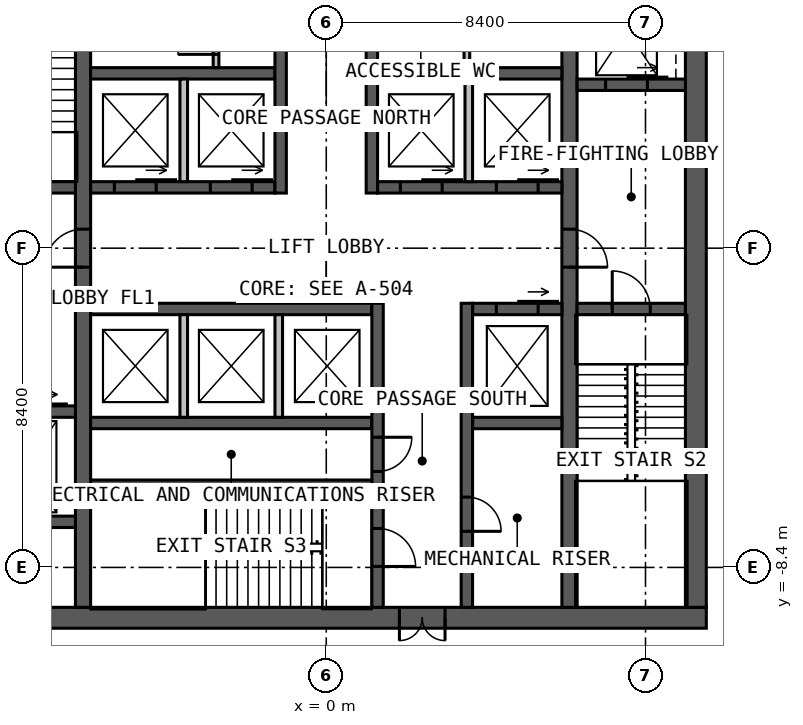
"""IFC4 building model, lengths in metres.
Left out: names, types, materials, properties, quantities, classifications, styles, units other than length and angle.
Written with IfcOpenShell. Run it as: python <this file> out.ifc"""

import sys

from ifc_helpers import new_model, si_unit, direction, frame, frame_2d, origin, place, context, subcontext, project, spatial, rectangle, extrude, element, fill, save


model = new_model("IFC4")
c1 = context("Model", 3, precision=1e-05, world=origin(), true_north=direction((0.0, 1.0)))
c2 = subcontext(c1, "Body", "Model", "MODEL_VIEW")
j1 = project(units=[si_unit("LENGTHUNIT", "METRE"), si_unit("PLANEANGLEUNIT", "RADIAN")], contexts=[c1])
p1 = place(None, origin())
s1 = spatial("IfcSite", under=j1, at=p1, CompositionType="ELEMENT")
p2 = place(p1, origin())
s2 = spatial("IfcBuilding", under=s1, at=p2, CompositionType="ELEMENT")
p3 = place(p2, frame((0.0, 0.0, 110.0)))
s3 = spatial("IfcBuildingStorey", under=s2, at=p3, CompositionType="ELEMENT", Elevation=110.0)
p4 = place(p3, frame((10.0, -9.725, 0.0), z_axis=(0.0, 0.0, 1.0), x_axis=(-1.0, 0.0, 0.0)))
e1 = element("IfcWall", 1, at=p4, inside=s3, PredefinedType="SOLIDWALL", context=c2, shape_type="SweptSolid", body=[
    extrude(rectangle(XDim=20.0, YDim=0.55, at=frame_2d((10.0, 0.0))), origin(), (0.0, 0.0, 1.0), 4.0),
])
p5 = place(p4, frame((6.875, 0.0, 0.0)))
e2 = element("IfcOpeningElement", 2, at=p5, cuts=e1, PredefinedType="OPENING", context=c2, shape_type="SweptSolid", body=[
    extrude(rectangle(XDim=1.2, YDim=2.2, at=frame_2d((0.6, 1.1))), frame((0.0, 0.285, 0.0), z_axis=(0.0, -1.0, 0.0), x_axis=(1.0, 0.0, 0.0)), (0.0, 0.0, 1.0), 0.57),
])
p6 = place(p3, frame((9.725, -9.45, 0.0), z_axis=(0.0, 0.0, 1.0), x_axis=(0.0, 1.0, 0.0)))
e3 = element("IfcWall", 3, at=p6, inside=s3, PredefinedType="SOLIDWALL", context=c2, shape_type="SweptSolid", body=[
    extrude(rectangle(XDim=18.9, YDim=0.55, at=frame_2d((9.45, 0.0))), origin(), (0.0, 0.0, 1.0), 4.0),
])
p7 = place(p3, frame((-6.4, -9.45, 0.0), z_axis=(0.0, 0.0, 1.0), x_axis=(0.0, 1.0, 0.0)))
e4 = element("IfcWall", 4, at=p7, inside=s3, PredefinedType="SOLIDWALL", context=c2, shape_type="SweptSolid", body=[
    extrude(rectangle(XDim=18.9, YDim=0.4, at=frame_2d((9.45, 0.0))), origin(), (0.0, 0.0, 1.0), 4.0),
])
p8 = place(p7, frame((8.95, 0.0, 0.0)))
e5 = element("IfcOpeningElement", 5, at=p8, cuts=e4, PredefinedType="OPENING", context=c2, shape_type="SweptSolid", body=[
    extrude(rectangle(XDim=1.0, YDim=2.2, at=frame_2d((0.5, 1.1))), frame((0.0, 0.21, 0.0), z_axis=(0.0, -1.0, 0.0), x_axis=(1.0, 0.0, 0.0)), (0.0, 0.0, 1.0), 0.42),
])
p9 = place(p3, frame((6.4, 9.45, 0.0), z_axis=(0.0, 0.0, 1.0), x_axis=(0.0, -1.0, 0.0)))
e6 = element("IfcWall", 6, at=p9, inside=s3, PredefinedType="SOLIDWALL", context=c2, shape_type="SweptSolid", body=[
    extrude(rectangle(XDim=18.9, YDim=0.4, at=frame_2d((9.45, 0.0))), origin(), (0.0, 0.0, 1.0), 4.0),
])
p10 = place(p9, frame((8.95, 0.0, 0.0)))
e7 = element("IfcOpeningElement", 7, at=p10, cuts=e6, PredefinedType="OPENING", context=c2, shape_type="SweptSolid", body=[
    extrude(rectangle(XDim=1.0, YDim=2.2, at=frame_2d((0.5, 1.1))), frame((0.0, 0.21, 0.0), z_axis=(0.0, -1.0, 0.0), x_axis=(1.0, 0.0, 0.0)), (0.0, 0.0, 1.0), 0.42),
])
p11 = place(p3, frame((-6.2, 1.6, 0.0), z_axis=(0.0, 0.0, 1.0), x_axis=(1.0, 0.0, 0.0)))
e8 = element("IfcWall", 8, at=p11, inside=s3, PredefinedType="SOLIDWALL", context=c2, shape_type="SweptSolid", body=[
    extrude(rectangle(XDim=4.85, YDim=0.3, at=frame_2d((2.425, 0.0))), origin(), (0.0, 0.0, 1.0), 4.0),
])
p12 = place(p11, frame((0.625, 0.0, 0.0)))
e9 = element("IfcOpeningElement", 9, at=p12, cuts=e8, PredefinedType="OPENING", context=c2, shape_type="SweptSolid", body=[
    extrude(rectangle(XDim=1.1, YDim=2.2, at=frame_2d((0.55, 1.1))), frame((0.0, 0.16, 0.0), z_axis=(0.0, -1.0, 0.0), x_axis=(1.0, 0.0, 0.0)), (0.0, 0.0, 1.0), 0.32),
])
p13 = place(p11, frame((3.15, 0.0, 0.0)))
e10 = element("IfcOpeningElement", 10, at=p13, cuts=e8, PredefinedType="OPENING", context=c2, shape_type="SweptSolid", body=[
    extrude(rectangle(XDim=1.1, YDim=2.2, at=frame_2d((0.55, 1.1))), frame((0.0, 0.16, 0.0), z_axis=(0.0, -1.0, 0.0), x_axis=(1.0, 0.0, 0.0)), (0.0, 0.0, 1.0), 0.32),
])
p14 = place(p3, frame((1.35, 1.6, 0.0), z_axis=(0.0, 0.0, 1.0), x_axis=(1.0, 0.0, 0.0)))
e11 = element("IfcWall", 11, at=p14, inside=s3, PredefinedType="SOLIDWALL", context=c2, shape_type="SweptSolid", body=[
    extrude(rectangle(XDim=4.85, YDim=0.3, at=frame_2d((2.425, 0.0))), origin(), (0.0, 0.0, 1.0), 4.0),
])
p15 = place(p14, frame((0.6, 0.0, 0.0)))
e12 = element("IfcOpeningElement", 12, at=p15, cuts=e11, PredefinedType="OPENING", context=c2, shape_type="SweptSolid", body=[
    extrude(rectangle(XDim=1.1, YDim=2.2, at=frame_2d((0.55, 1.1))), frame((0.0, 0.16, 0.0), z_axis=(0.0, -1.0, 0.0), x_axis=(1.0, 0.0, 0.0)), (0.0, 0.0, 1.0), 0.32),
])
p16 = place(p14, frame((3.125, 0.0, 0.0)))
e13 = element("IfcOpeningElement", 13, at=p16, cuts=e11, PredefinedType="OPENING", context=c2, shape_type="SweptSolid", body=[
    extrude(rectangle(XDim=1.1, YDim=2.2, at=frame_2d((0.55, 1.1))), frame((0.0, 0.16, 0.0), z_axis=(0.0, -1.0, 0.0), x_axis=(1.0, 0.0, 0.0)), (0.0, 0.0, 1.0), 0.32),
])
for number, where, z_axis, x_axis in (
    (14, (-6.2, 4.6, 0.0), (0.0, 0.0, 1.0), (1.0, 0.0, 0.0)),
    (15, (1.35, 4.6, 0.0), (0.0, 0.0, 1.0), (1.0, 0.0, 0.0)),
):
    element("IfcWall", number, at=place(p3, frame(where, z_axis=z_axis, x_axis=x_axis)), inside=s3, PredefinedType="SOLIDWALL", context=c2, shape_type="SweptSolid", body=[
        extrude(rectangle(XDim=4.85, YDim=0.3, at=frame_2d((2.425, 0.0))), origin(), (0.0, 0.0, 1.0), 4.0),
    ])
p17 = place(p3, frame((-1.2, 1.45, 0.0), z_axis=(0.0, 0.0, 1.0), x_axis=(0.0, 1.0, 0.0)))
e16 = element("IfcWall", 16, at=p17, inside=s3, PredefinedType="SOLIDWALL", context=c2, shape_type="SweptSolid", body=[
    extrude(rectangle(XDim=8.0, YDim=0.3, at=frame_2d((4.0, 0.0))), origin(), (0.0, 0.0, 1.0), 4.0),
])
p18 = place(p17, frame((5.05, 0.0, 0.0)))
e17 = element("IfcOpeningElement", 17, at=p18, cuts=e16, PredefinedType="OPENING", context=c2, shape_type="SweptSolid", body=[
    extrude(rectangle(XDim=1.0, YDim=2.2, at=frame_2d((0.5, 1.1))), frame((0.0, 0.16, 0.0), z_axis=(0.0, -1.0, 0.0), x_axis=(1.0, 0.0, 0.0)), (0.0, 0.0, 1.0), 0.32),
])
p19 = place(p3, frame((1.2, 1.45, 0.0), z_axis=(0.0, 0.0, 1.0), x_axis=(0.0, 1.0, 0.0)))
e18 = element("IfcWall", 18, at=p19, inside=s3, PredefinedType="SOLIDWALL", context=c2, shape_type="SweptSolid", body=[
    extrude(rectangle(XDim=8.0, YDim=0.3, at=frame_2d((4.0, 0.0))), origin(), (0.0, 0.0, 1.0), 4.0),
])
p20 = place(p19, frame((3.8, 0.0, 0.0)))
e19 = element("IfcOpeningElement", 19, at=p20, cuts=e18, PredefinedType="OPENING", context=c2, shape_type="SweptSolid", body=[
    extrude(rectangle(XDim=1.0, YDim=2.2, at=frame_2d((0.5, 1.1))), frame((0.0, 0.16, 0.0), z_axis=(0.0, -1.0, 0.0), x_axis=(1.0, 0.0, 0.0)), (0.0, 0.0, 1.0), 0.32),
])
p21 = place(p19, frame((6.15, 0.0, 0.0)))
e20 = element("IfcOpeningElement", 20, at=p21, cuts=e18, PredefinedType="OPENING", context=c2, shape_type="SweptSolid", body=[
    extrude(rectangle(XDim=1.0, YDim=2.2, at=frame_2d((0.5, 1.1))), frame((0.0, 0.16, 0.0), z_axis=(0.0, -1.0, 0.0), x_axis=(1.0, 0.0, 0.0)), (0.0, 0.0, 1.0), 0.32),
])
p22 = place(p3, frame((-6.2, -1.6, 0.0), z_axis=(0.0, 0.0, 1.0), x_axis=(1.0, 0.0, 0.0)))
e21 = element("IfcWall", 21, at=p22, inside=s3, PredefinedType="SOLIDWALL", context=c2, shape_type="SweptSolid", body=[
    extrude(rectangle(XDim=7.4, YDim=0.3, at=frame_2d((3.7, 0.0))), origin(), (0.0, 0.0, 1.0), 4.0),
])
p23 = place(p3, frame((3.85, -1.6, 0.0), z_axis=(0.0, 0.0, 1.0), x_axis=(1.0, 0.0, 0.0)))
e22 = element("IfcWall", 22, at=p23, inside=s3, PredefinedType="SOLIDWALL", context=c2, shape_type="SweptSolid", body=[
    extrude(rectangle(XDim=2.35, YDim=0.3, at=frame_2d((1.175, 0.0))), origin(), (0.0, 0.0, 1.0), 4.0),
])
p24 = place(p23, frame((0.625, 0.0, 0.0)))
e23 = element("IfcOpeningElement", 23, at=p24, cuts=e22, PredefinedType="OPENING", context=c2, shape_type="SweptSolid", body=[
    extrude(rectangle(XDim=1.1, YDim=2.2, at=frame_2d((0.55, 1.1))), frame((0.0, 0.16, 0.0), z_axis=(0.0, -1.0, 0.0), x_axis=(1.0, 0.0, 0.0)), (0.0, 0.0, 1.0), 0.32),
])
p25 = place(p3, frame((-6.2, -4.6, 0.0), z_axis=(0.0, 0.0, 1.0), x_axis=(1.0, 0.0, 0.0)))
e24 = element("IfcWall", 24, at=p25, inside=s3, PredefinedType="SOLIDWALL", context=c2, shape_type="SweptSolid", body=[
    extrude(rectangle(XDim=7.4, YDim=0.3, at=frame_2d((3.7, 0.0))), origin(), (0.0, 0.0, 1.0), 4.0),
])
p26 = place(p3, frame((3.85, -4.6, 0.0), z_axis=(0.0, 0.0, 1.0), x_axis=(1.0, 0.0, 0.0)))
e25 = element("IfcWall", 25, at=p26, inside=s3, PredefinedType="SOLIDWALL", context=c2, shape_type="SweptSolid", body=[
    extrude(rectangle(XDim=2.35, YDim=0.3, at=frame_2d((1.175, 0.0))), origin(), (0.0, 0.0, 1.0), 4.0),
])
p27 = place(p3, frame((1.35, -1.45, 0.0), z_axis=(0.0, 0.0, 1.0), x_axis=(0.0, -1.0, 0.0)))
e26 = element("IfcWall", 26, at=p27, inside=s3, PredefinedType="SOLIDWALL", context=c2, shape_type="SweptSolid", body=[
    extrude(rectangle(XDim=8.0, YDim=0.3, at=frame_2d((4.0, 0.0))), origin(), (0.0, 0.0, 1.0), 4.0),
])
p28 = place(p27, frame((5.925, 0.0, 0.0)))
e27 = element("IfcOpeningElement", 27, at=p28, cuts=e26, PredefinedType="OPENING", context=c2, shape_type="SweptSolid", body=[
    extrude(rectangle(XDim=1.0, YDim=2.2, at=frame_2d((0.5, 1.1))), frame((0.0, 0.16, 0.0), z_axis=(0.0, -1.0, 0.0), x_axis=(1.0, 0.0, 0.0)), (0.0, 0.0, 1.0), 0.32),
])
p29 = place(p27, frame((3.525, 0.0, 0.0)))
e28 = element("IfcOpeningElement", 28, at=p29, cuts=e26, PredefinedType="OPENING", context=c2, shape_type="SweptSolid", body=[
    extrude(rectangle(XDim=0.9, YDim=2.2, at=frame_2d((0.45, 1.1))), frame((0.0, 0.16, 0.0), z_axis=(0.0, -1.0, 0.0), x_axis=(1.0, 0.0, 0.0)), (0.0, 0.0, 1.0), 0.32),
])
p30 = place(p3, frame((3.7, -1.45, 0.0), z_axis=(0.0, 0.0, 1.0), x_axis=(0.0, -1.0, 0.0)))
e29 = element("IfcWall", 29, at=p30, inside=s3, PredefinedType="SOLIDWALL", context=c2, shape_type="SweptSolid", body=[
    extrude(rectangle(XDim=8.0, YDim=0.3, at=frame_2d((4.0, 0.0))), origin(), (0.0, 0.0, 1.0), 4.0),
])
p31 = place(p30, frame((5.1, 0.0, 0.0)))
e30 = element("IfcOpeningElement", 30, at=p31, cuts=e29, PredefinedType="OPENING", context=c2, shape_type="SweptSolid", body=[
    extrude(rectangle(XDim=0.9, YDim=2.2, at=frame_2d((0.45, 1.1))), frame((0.0, 0.16, 0.0), z_axis=(0.0, -1.0, 0.0), x_axis=(1.0, 0.0, 0.0)), (0.0, 0.0, 1.0), 0.32),
])
p32 = place(p3, frame((-6.2, -6.2, 0.0), z_axis=(0.0, 0.0, 1.0), x_axis=(1.0, 0.0, 0.0)))
e31 = element("IfcWall", 31, at=p32, inside=s3, PredefinedType="SOLIDWALL", context=c2, shape_type="SweptSolid", body=[
    extrude(rectangle(XDim=7.4, YDim=0.2, at=frame_2d((3.7, 0.0))), origin(), (0.0, 0.0, 1.0), 4.0),
])
p33 = place(p3, frame((-9.45, 1.6, 0.0), z_axis=(0.0, 0.0, 1.0), x_axis=(1.0, 0.0, 0.0)))
e32 = element("IfcWall", 32, at=p33, inside=s3, PredefinedType="SOLIDWALL", context=c2, shape_type="SweptSolid", body=[
    extrude(rectangle(XDim=2.85, YDim=0.3, at=frame_2d((1.425, 0.0))), origin(), (0.0, 0.0, 1.0), 4.0),
])
p34 = place(p33, frame((0.925, 0.0, 0.0)))
e33 = element("IfcOpeningElement", 33, at=p34, cuts=e32, PredefinedType="OPENING", context=c2, shape_type="SweptSolid", body=[
    extrude(rectangle(XDim=1.0, YDim=2.2, at=frame_2d((0.5, 1.1))), frame((0.0, 0.16, 0.0), z_axis=(0.0, -1.0, 0.0), x_axis=(1.0, 0.0, 0.0)), (0.0, 0.0, 1.0), 0.32),
])
p35 = place(p3, frame((6.6, -1.6, 0.0), z_axis=(0.0, 0.0, 1.0), x_axis=(1.0, 0.0, 0.0)))
e34 = element("IfcWall", 34, at=p35, inside=s3, PredefinedType="SOLIDWALL", context=c2, shape_type="SweptSolid", body=[
    extrude(rectangle(XDim=2.85, YDim=0.3, at=frame_2d((1.425, 0.0))), origin(), (0.0, 0.0, 1.0), 4.0),
])
p36 = place(p35, frame((0.925, 0.0, 0.0)))
e35 = element("IfcOpeningElement", 35, at=p36, cuts=e34, PredefinedType="OPENING", context=c2, shape_type="SweptSolid", body=[
    extrude(rectangle(XDim=1.0, YDim=2.2, at=frame_2d((0.5, 1.1))), frame((0.0, 0.16, 0.0), z_axis=(0.0, -1.0, 0.0), x_axis=(1.0, 0.0, 0.0)), (0.0, 0.0, 1.0), 0.32),
])
p37 = place(p3, frame((-9.45, -4.3, 0.0), z_axis=(0.0, 0.0, 1.0), x_axis=(1.0, 0.0, 0.0)))
e36 = element("IfcWall", 36, at=p37, inside=s3, PredefinedType="SOLIDWALL", context=c2, shape_type="SweptSolid", body=[
    extrude(rectangle(XDim=2.85, YDim=0.3, at=frame_2d((1.425, 0.0))), origin(), (0.0, 0.0, 1.0), 4.0),
])
p38 = place(p37, frame((1.0, 0.0, 0.0)))
e37 = element("IfcOpeningElement", 37, at=p38, cuts=e36, PredefinedType="OPENING", context=c2, shape_type="SweptSolid", body=[
    extrude(rectangle(XDim=1.1, YDim=2.2, at=frame_2d((0.55, 1.1))), frame((0.0, 0.16, 0.0), z_axis=(0.0, -1.0, 0.0), x_axis=(1.0, 0.0, 0.0)), (0.0, 0.0, 1.0), 0.32),
])
p39 = place(p3, frame((6.6, 4.3, 0.0), z_axis=(0.0, 0.0, 1.0), x_axis=(1.0, 0.0, 0.0)))
e38 = element("IfcWall", 38, at=p39, inside=s3, PredefinedType="SOLIDWALL", context=c2, shape_type="SweptSolid", body=[
    extrude(rectangle(XDim=2.85, YDim=0.3, at=frame_2d((1.425, 0.0))), origin(), (0.0, 0.0, 1.0), 4.0),
])
p40 = place(p39, frame((0.75, 0.0, 0.0)))
e39 = element("IfcOpeningElement", 39, at=p40, cuts=e38, PredefinedType="OPENING", context=c2, shape_type="SweptSolid", body=[
    extrude(rectangle(XDim=1.1, YDim=2.2, at=frame_2d((0.55, 1.1))), frame((0.0, 0.16, 0.0), z_axis=(0.0, -1.0, 0.0), x_axis=(1.0, 0.0, 0.0)), (0.0, 0.0, 1.0), 0.32),
])
p41 = place(p3, frame((-9.45, -7.2, 0.0), z_axis=(0.0, 0.0, 1.0), x_axis=(1.0, 0.0, 0.0)))
e40 = element("IfcWall", 40, at=p41, inside=s3, PredefinedType="SOLIDWALL", context=c2, shape_type="SweptSolid", body=[
    extrude(rectangle(XDim=2.85, YDim=0.3, at=frame_2d((1.425, 0.0))), origin(), (0.0, 0.0, 1.0), 4.0),
])
for number, where, z_axis, x_axis in (
    (41, (-3.75, 1.75, 0.0), (0.0, 0.0, 1.0), (0.0, 1.0, 0.0)),
    (42, (3.75, 1.75, 0.0), (0.0, 0.0, 1.0), (0.0, 1.0, 0.0)),
    (43, (-3.75, -1.75, 0.0), (0.0, 0.0, 1.0), (0.0, -1.0, 0.0)),
    (44, (-1.25, -1.75, 0.0), (0.0, 0.0, 1.0), (0.0, -1.0, 0.0)),
):
    element("IfcWall", number, at=place(p3, frame(where, z_axis=z_axis, x_axis=x_axis)), inside=s3, PredefinedType="SOLIDWALL", context=c2, shape_type="SweptSolid", body=[
        extrude(rectangle(XDim=2.7, YDim=0.2, at=frame_2d((1.35, 0.0))), origin(), (0.0, 0.0, 1.0), 3.75),
    ])
p42 = place(p3, frame((3.7, 4.75, 0.0), z_axis=(0.0, 0.0, 1.0), x_axis=(0.0, 1.0, 0.0)))
e45 = element("IfcWall", 45, at=p42, inside=s3, PredefinedType="PARTITIONING", context=c2, shape_type="SweptSolid", body=[
    extrude(rectangle(XDim=1.975, YDim=0.15, at=frame_2d((0.988, 0.0))), origin(), (0.0, 0.0, 1.0), 3.75),
])
p43 = place(p3, frame((-2.9, 4.75, 0.0), z_axis=(0.0, 0.0, 1.0), x_axis=(0.0, 1.0, 0.0)))
e46 = element("IfcWall", 46, at=p43, inside=s3, PredefinedType="PARTITIONING", context=c2, shape_type="SweptSolid", body=[
    extrude(rectangle(XDim=4.7, YDim=0.15, at=frame_2d((2.35, 0.0))), origin(), (0.0, 0.0, 1.0), 3.75),
])
p44 = place(p43, frame((0.35, 0.0, 0.0)))
e47 = element("IfcOpeningElement", 47, at=p44, cuts=e46, PredefinedType="OPENING", context=c2, shape_type="SweptSolid", body=[
    extrude(rectangle(XDim=1.0, YDim=2.2, at=frame_2d((0.5, 1.1))), frame((0.0, 0.085, 0.0), z_axis=(0.0, -1.0, 0.0), x_axis=(1.0, 0.0, 0.0)), (0.0, 0.0, 1.0), 0.17),
])
p45 = place(p5, origin())
e48 = element("IfcDoor", 48, at=p45, inside=s3, OperationType="DOUBLE_DOOR_SINGLE_SWING", PredefinedType="DOOR", context=c2, shape_type="SweptSolid", body=[
    extrude(rectangle(XDim=1.2, YDim=2.2, at=frame_2d((0.6, 1.1))), frame((0.0, 0.025, 0.0), z_axis=(0.0, -1.0, 0.0), x_axis=(1.0, 0.0, 0.0)), (0.0, 0.0, 1.0), 0.05),
])
fill(e2, e48)
p46 = place(p8, origin())
e49 = element("IfcDoor", 49, at=p46, inside=s3, OperationType="SINGLE_SWING_LEFT", PredefinedType="DOOR", context=c2, shape_type="SweptSolid", body=[
    extrude(rectangle(XDim=1.0, YDim=2.2, at=frame_2d((0.5, 1.1))), frame((0.0, 0.025, 0.0), z_axis=(0.0, -1.0, 0.0), x_axis=(1.0, 0.0, 0.0)), (0.0, 0.0, 1.0), 0.05),
])
fill(e5, e49)
p47 = place(p10, origin())
e50 = element("IfcDoor", 50, at=p47, inside=s3, OperationType="SINGLE_SWING_RIGHT", PredefinedType="DOOR", context=c2, shape_type="SweptSolid", body=[
    extrude(rectangle(XDim=1.0, YDim=2.2, at=frame_2d((0.5, 1.1))), frame((0.0, 0.025, 0.0), z_axis=(0.0, -1.0, 0.0), x_axis=(1.0, 0.0, 0.0)), (0.0, 0.0, 1.0), 0.05),
])
fill(e7, e50)
p48 = place(p36, origin())
e51 = element("IfcDoor", 51, at=p48, inside=s3, OperationType="SINGLE_SWING_LEFT", PredefinedType="DOOR", context=c2, shape_type="SweptSolid", body=[
    extrude(rectangle(XDim=1.0, YDim=2.2, at=frame_2d((0.5, 1.1))), frame((0.0, 0.025, 0.0), z_axis=(0.0, -1.0, 0.0), x_axis=(1.0, 0.0, 0.0)), (0.0, 0.0, 1.0), 0.05),
])
fill(e35, e51)
p49 = place(p28, origin())
e52 = element("IfcDoor", 52, at=p49, inside=s3, OperationType="SINGLE_SWING_RIGHT", PredefinedType="DOOR", context=c2, shape_type="SweptSolid", body=[
    extrude(rectangle(XDim=1.0, YDim=2.2, at=frame_2d((0.5, 1.1))), frame((0.0, 0.025, 0.0), z_axis=(0.0, -1.0, 0.0), x_axis=(1.0, 0.0, 0.0)), (0.0, 0.0, 1.0), 0.05),
])
fill(e27, e52)
p50 = place(p29, origin())
e53 = element("IfcDoor", 53, at=p50, inside=s3, OperationType="SINGLE_SWING_LEFT", PredefinedType="DOOR", context=c2, shape_type="SweptSolid", body=[
    extrude(rectangle(XDim=0.9, YDim=2.2, at=frame_2d((0.45, 1.1))), frame((0.0, 0.025, 0.0), z_axis=(0.0, -1.0, 0.0), x_axis=(1.0, 0.0, 0.0)), (0.0, 0.0, 1.0), 0.05),
])
fill(e28, e53)
p51 = place(p31, origin())
e54 = element("IfcDoor", 54, at=p51, inside=s3, OperationType="SINGLE_SWING_RIGHT", PredefinedType="DOOR", context=c2, shape_type="SweptSolid", body=[
    extrude(rectangle(XDim=0.9, YDim=2.2, at=frame_2d((0.45, 1.1))), frame((0.0, 0.025, 0.0), z_axis=(0.0, -1.0, 0.0), x_axis=(1.0, 0.0, 0.0)), (0.0, 0.0, 1.0), 0.05),
])
fill(e30, e54)
p52 = place(p44, origin())
e55 = element("IfcDoor", 55, at=p52, inside=s3, OperationType="SINGLE_SWING_LEFT", PredefinedType="DOOR", context=c2, shape_type="SweptSolid", body=[
    extrude(rectangle(XDim=1.0, YDim=2.2, at=frame_2d((0.5, 1.1))), frame((0.0, 0.025, 0.0), z_axis=(0.0, -1.0, 0.0), x_axis=(1.0, 0.0, 0.0)), (0.0, 0.0, 1.0), 0.05),
])
fill(e47, e55)
p53 = place(p12, origin())
e56 = element("IfcDoor", 56, at=p53, inside=s3, OperationType="SLIDING_TO_LEFT", PredefinedType="DOOR", context=c2, shape_type="SweptSolid", body=[
    extrude(rectangle(XDim=1.1, YDim=2.2, at=frame_2d((0.55, 1.1))), frame((0.0, 0.025, 0.0), z_axis=(0.0, -1.0, 0.0), x_axis=(1.0, 0.0, 0.0)), (0.0, 0.0, 1.0), 0.05),
])
fill(e9, e56)
p54 = place(p13, origin())
e57 = element("IfcDoor", 57, at=p54, inside=s3, OperationType="SLIDING_TO_LEFT", PredefinedType="DOOR", context=c2, shape_type="SweptSolid", body=[
    extrude(rectangle(XDim=1.1, YDim=2.2, at=frame_2d((0.55, 1.1))), frame((0.0, 0.025, 0.0), z_axis=(0.0, -1.0, 0.0), x_axis=(1.0, 0.0, 0.0)), (0.0, 0.0, 1.0), 0.05),
])
fill(e10, e57)
p55 = place(p15, origin())
e58 = element("IfcDoor", 58, at=p55, inside=s3, OperationType="SLIDING_TO_LEFT", PredefinedType="DOOR", context=c2, shape_type="SweptSolid", body=[
    extrude(rectangle(XDim=1.1, YDim=2.2, at=frame_2d((0.55, 1.1))), frame((0.0, 0.025, 0.0), z_axis=(0.0, -1.0, 0.0), x_axis=(1.0, 0.0, 0.0)), (0.0, 0.0, 1.0), 0.05),
])
fill(e12, e58)
p56 = place(p16, origin())
e59 = element("IfcDoor", 59, at=p56, inside=s3, OperationType="SLIDING_TO_LEFT", PredefinedType="DOOR", context=c2, shape_type="SweptSolid", body=[
    extrude(rectangle(XDim=1.1, YDim=2.2, at=frame_2d((0.55, 1.1))), frame((0.0, 0.025, 0.0), z_axis=(0.0, -1.0, 0.0), x_axis=(1.0, 0.0, 0.0)), (0.0, 0.0, 1.0), 0.05),
])
fill(e13, e59)
p57 = place(p24, origin())
e60 = element("IfcDoor", 60, at=p57, inside=s3, OperationType="SLIDING_TO_LEFT", PredefinedType="DOOR", context=c2, shape_type="SweptSolid", body=[
    extrude(rectangle(XDim=1.1, YDim=2.2, at=frame_2d((0.55, 1.1))), frame((0.0, 0.025, 0.0), z_axis=(0.0, -1.0, 0.0), x_axis=(1.0, 0.0, 0.0)), (0.0, 0.0, 1.0), 0.05),
])
fill(e23, e60)
p58 = place(p40, origin())
e61 = element("IfcDoor", 61, at=p58, inside=s3, OperationType="SLIDING_TO_LEFT", PredefinedType="DOOR", context=c2, shape_type="SweptSolid", body=[
    extrude(rectangle(XDim=1.1, YDim=2.2, at=frame_2d((0.55, 1.1))), frame((0.0, 0.025, 0.0), z_axis=(0.0, -1.0, 0.0), x_axis=(1.0, 0.0, 0.0)), (0.0, 0.0, 1.0), 0.05),
])
fill(e39, e61)
save(model, sys.argv[1])
